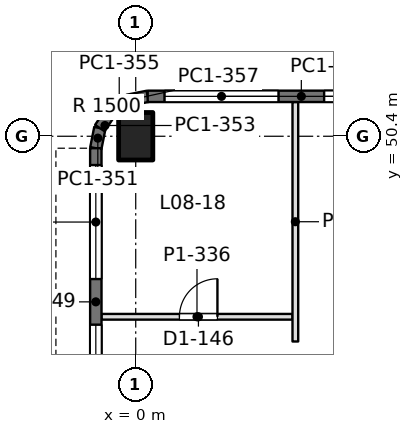
"""IFC4 building model, lengths in metres.
Left out: names, types, materials, properties, quantities, classifications, styles, units other than length and angle.
Written with IfcOpenShell. Run it as: python <this file> out.ifc"""

import sys

from ifc_helpers import new_model, si_unit, direction, frame, frame_2d, origin, origin_2d, place, context, subcontext, project, spatial, rectangle, extrude, element, fill, save


model = new_model("IFC4")
c1 = context("Model", 3, precision=1e-05, world=origin(), true_north=direction((0.0, 1.0)))
c2 = subcontext(c1, "Body", "Model", "MODEL_VIEW")
j1 = project(units=[si_unit("LENGTHUNIT", "METRE"), si_unit("PLANEANGLEUNIT", "RADIAN")], contexts=[c1])
p1 = place(None, origin())
s1 = spatial("IfcSite", under=j1, at=p1, CompositionType="ELEMENT")
p2 = place(p1, origin())
s2 = spatial("IfcBuilding", under=s1, at=p2, CompositionType="ELEMENT")
p3 = place(p2, frame((0.0, 0.0, 36.9)))
s3 = spatial("IfcBuildingStorey", under=s2, at=p3, CompositionType="ELEMENT", Elevation=36.9)
p4 = place(p3, frame((0.0, 50.4, 0.0), z_axis=(0.0, 0.0, 1.0), x_axis=(1.0, 0.0, 0.0)))
e1 = element("IfcColumn", 1, at=p4, inside=s3, PredefinedType="COLUMN", context=c2, shape_type="SweptSolid", body=[
    extrude(rectangle(XDim=0.9, YDim=1.25, at=origin_2d()), origin(), (0.0, 0.0, 1.0), 4.5),
])
p5 = place(p3, frame((-1.05, 42.0, 0.0), z_axis=(0.0, 0.0, 1.0), x_axis=(0.0, 1.0, 0.0)))
e2 = element("IfcWall", 2, at=p5, inside=s3, PredefinedType="SOLIDWALL", context=c2, shape_type="SweptSolid", body=[
    extrude(rectangle(XDim=8.085, YDim=0.3, at=frame_2d((4.042, 0.0))), origin(), (0.0, 0.0, 1.0), 4.34),
])
p6 = place(p5, frame((0.443, 0.0, 0.9)))
e3 = element("IfcOpeningElement", 3, at=p6, cuts=e2, PredefinedType="OPENING", context=c2, shape_type="SweptSolid", body=[
    extrude(rectangle(XDim=3.0, YDim=1.9, at=frame_2d((1.5, 0.95))), frame((0.0, 0.16, 0.0), z_axis=(0.0, -1.0, 0.0), x_axis=(1.0, 0.0, 0.0)), (0.0, 0.0, 1.0), 0.32),
])
p7 = place(p5, frame((4.643, 0.0, 0.9)))
e4 = element("IfcOpeningElement", 4, at=p7, cuts=e2, PredefinedType="OPENING", context=c2, shape_type="SweptSolid", body=[
    extrude(rectangle(XDim=3.0, YDim=1.9, at=frame_2d((1.5, 0.95))), frame((0.0, 0.16, 0.0), z_axis=(0.0, -1.0, 0.0), x_axis=(1.0, 0.0, 0.0)), (0.0, 0.0, 1.0), 0.32),
])
p8 = place(p3, frame((-1.05, 50.085, 0.0), z_axis=(0.0, 0.0, 1.0), x_axis=(0.195073962632, 0.980788534345, 0.0)))
e5 = element("IfcWall", 5, at=p8, inside=s3, PredefinedType="SOLIDWALL", context=c2, shape_type="SweptSolid", body=[
    extrude(rectangle(XDim=0.541, YDim=0.3, at=frame_2d((0.271, 0.0))), origin(), (0.0, 0.0, 1.0), 4.34),
])
for number, where, z_axis, x_axis in (
    (6, (-0.945, 50.615, 0.0), (0.0, 0.0, 1.0), (0.556, 0.831, 0.0)),
    (7, (-0.653, 51.052, 0.0), (0.0, 0.0, 1.0), (0.831, 0.556, 0.0)),
):
    element("IfcWall", number, at=place(p3, frame(where, z_axis=z_axis, x_axis=x_axis)), inside=s3, PredefinedType="SOLIDWALL", context=c2, shape_type="SweptSolid", body=[
        extrude(rectangle(XDim=0.526, YDim=0.3, at=frame_2d((0.263, 0.0))), origin(), (0.0, 0.0, 1.0), 4.34),
    ])
p9 = place(p3, frame((-0.216, 51.344, 0.0), z_axis=(0.0, 0.0, 1.0), x_axis=(0.980788534345, 0.195073962632, 0.0)))
e8 = element("IfcWall", 8, at=p9, inside=s3, PredefinedType="SOLIDWALL", context=c2, shape_type="SweptSolid", body=[
    extrude(rectangle(XDim=0.541, YDim=0.3, at=frame_2d((0.271, 0.0))), origin(), (0.0, 0.0, 1.0), 4.34),
])
p10 = place(p3, frame((0.315, 51.45, 0.0), z_axis=(0.0, 0.0, 1.0), x_axis=(1.0, 0.0, 0.0)))
e9 = element("IfcWall", 9, at=p10, inside=s3, PredefinedType="SOLIDWALL", context=c2, shape_type="SweptSolid", body=[
    extrude(rectangle(XDim=8.085, YDim=0.3, at=frame_2d((4.042, 0.0))), origin(), (0.0, 0.0, 1.0), 4.34),
])
p11 = place(p10, frame((0.443, 0.0, 0.9)))
e10 = element("IfcOpeningElement", 10, at=p11, cuts=e9, PredefinedType="OPENING", context=c2, shape_type="SweptSolid", body=[
    extrude(rectangle(XDim=3.0, YDim=1.9, at=frame_2d((1.5, 0.95))), frame((0.0, 0.16, 0.0), z_axis=(0.0, -1.0, 0.0), x_axis=(1.0, 0.0, 0.0)), (0.0, 0.0, 1.0), 0.32),
])
p12 = place(p10, frame((4.643, 0.0, 0.9)))
e11 = element("IfcOpeningElement", 11, at=p12, cuts=e9, PredefinedType="OPENING", context=c2, shape_type="SweptSolid", body=[
    extrude(rectangle(XDim=3.0, YDim=1.9, at=frame_2d((1.5, 0.95))), frame((0.0, 0.16, 0.0), z_axis=(0.0, -1.0, 0.0), x_axis=(1.0, 0.0, 0.0)), (0.0, 0.0, 1.0), 0.32),
])
p13 = place(p3, frame((-0.902, 45.65, 0.0), z_axis=(0.0, 0.0, 1.0), x_axis=(1.0, 0.0, 0.0)))
e12 = element("IfcWall", 12, at=p13, inside=s3, PredefinedType="PARTITIONING", context=c2, shape_type="SweptSolid", body=[
    extrude(rectangle(XDim=5.028, YDim=0.15, at=frame_2d((2.514, 0.0))), origin(), (0.0, 0.0, 1.0), 3.84),
])
p14 = place(p13, frame((2.052, 0.0, 0.0)))
e13 = element("IfcOpeningElement", 13, at=p14, cuts=e12, PredefinedType="OPENING", context=c2, shape_type="SweptSolid", body=[
    extrude(rectangle(XDim=1.0, YDim=2.2, at=frame_2d((0.5, 1.1))), frame((0.0, 0.085, 0.0), z_axis=(0.0, -1.0, 0.0), x_axis=(1.0, 0.0, 0.0)), (0.0, 0.0, 1.0), 0.17),
])
p15 = place(p3, frame((4.2, 45.0, 0.0), z_axis=(0.0, 0.0, 1.0), x_axis=(0.0, 1.0, 0.0)))
e14 = element("IfcWall", 14, at=p15, inside=s3, PredefinedType="PARTITIONING", context=c2, shape_type="SweptSolid", body=[
    extrude(rectangle(XDim=6.302, YDim=0.15, at=frame_2d((3.151, 0.0))), origin(), (0.0, 0.0, 1.0), 3.84),
])
p16 = place(p6, origin())
e15 = element("IfcWindow", 15, at=p16, inside=s3, PartitioningType="SINGLE_PANEL", PredefinedType="WINDOW", context=c2, shape_type="SweptSolid", body=[
    extrude(rectangle(XDim=3.0, YDim=1.9, at=frame_2d((1.5, 0.95))), frame((0.0, 0.03, 0.0), z_axis=(0.0, -1.0, 0.0), x_axis=(1.0, 0.0, 0.0)), (0.0, 0.0, 1.0), 0.06),
])
fill(e3, e15)
p17 = place(p7, origin())
e16 = element("IfcWindow", 16, at=p17, inside=s3, PartitioningType="SINGLE_PANEL", PredefinedType="WINDOW", context=c2, shape_type="SweptSolid", body=[
    extrude(rectangle(XDim=3.0, YDim=1.9, at=frame_2d((1.5, 0.95))), frame((0.0, 0.03, 0.0), z_axis=(0.0, -1.0, 0.0), x_axis=(1.0, 0.0, 0.0)), (0.0, 0.0, 1.0), 0.06),
])
fill(e4, e16)
p18 = place(p11, origin())
e17 = element("IfcWindow", 17, at=p18, inside=s3, PartitioningType="SINGLE_PANEL", PredefinedType="WINDOW", context=c2, shape_type="SweptSolid", body=[
    extrude(rectangle(XDim=3.0, YDim=1.9, at=frame_2d((1.5, 0.95))), frame((0.0, 0.03, 0.0), z_axis=(0.0, -1.0, 0.0), x_axis=(1.0, 0.0, 0.0)), (0.0, 0.0, 1.0), 0.06),
])
fill(e10, e17)
p19 = place(p12, origin())
e18 = element("IfcWindow", 18, at=p19, inside=s3, PartitioningType="SINGLE_PANEL", PredefinedType="WINDOW", context=c2, shape_type="SweptSolid", body=[
    extrude(rectangle(XDim=3.0, YDim=1.9, at=frame_2d((1.5, 0.95))), frame((0.0, 0.03, 0.0), z_axis=(0.0, -1.0, 0.0), x_axis=(1.0, 0.0, 0.0)), (0.0, 0.0, 1.0), 0.06),
])
fill(e11, e18)
p20 = place(p14, origin())
e19 = element("IfcDoor", 19, at=p20, inside=s3, OperationType="SINGLE_SWING_RIGHT", PredefinedType="DOOR", context=c2, shape_type="SweptSolid", body=[
    extrude(rectangle(XDim=1.0, YDim=2.2, at=frame_2d((0.5, 1.1))), frame((0.0, 0.025, 0.0), z_axis=(0.0, -1.0, 0.0), x_axis=(1.0, 0.0, 0.0)), (0.0, 0.0, 1.0), 0.05),
])
fill(e13, e19)
save(model, sys.argv[1])
